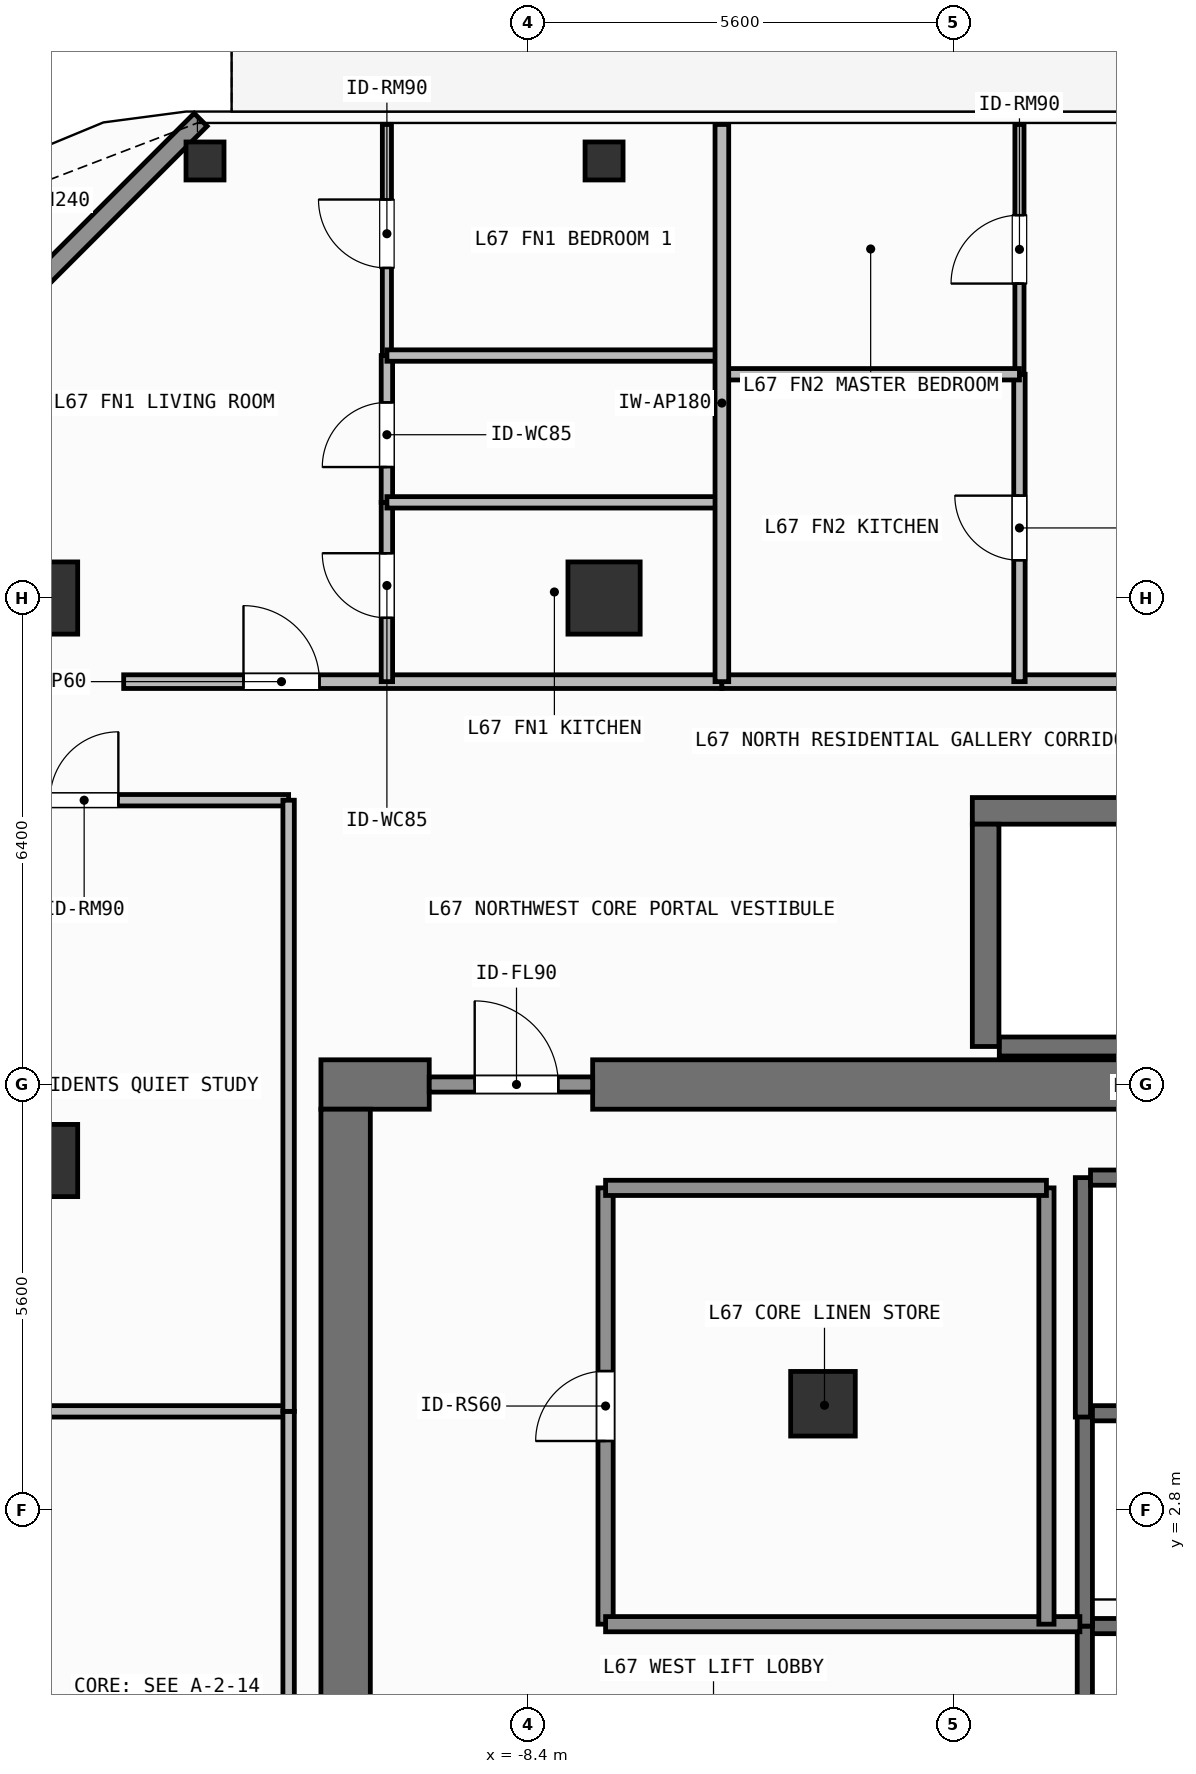
"""IFC4 building model, lengths in metres.
Left out: names, types, materials, properties, quantities, classifications, styles, units other than length and angle.
Written with IfcOpenShell. Run it as: python <this file> out.ifc"""

import sys

from ifc_helpers import new_model, si_unit, direction, frame, frame_2d, origin, origin_2d, place, context, subcontext, project, spatial, rectangle, hollow_rectangle, extrude, element, fill, save


model = new_model("IFC4")
c1 = context("Model", 3, precision=1e-05, world=origin(), true_north=direction((0.0, 1.0)))
c2 = subcontext(c1, "Body", "Model", "MODEL_VIEW")
j1 = project(units=[si_unit("LENGTHUNIT", "METRE"), si_unit("PLANEANGLEUNIT", "RADIAN")], contexts=[c1])
p1 = place(None, origin())
s1 = spatial("IfcSite", under=j1, at=p1, CompositionType="ELEMENT")
p2 = place(p1, origin())
s2 = spatial("IfcBuilding", under=s1, at=p2, CompositionType="ELEMENT")
p3 = place(p2, frame((0.0, 0.0, 274.2)))
s3 = spatial("IfcBuildingStorey", under=s2, at=p3, CompositionType="ELEMENT", Elevation=274.2)
p4 = place(p3, frame((-11.125, 8.4, 0.0), z_axis=(0.0, 0.0, 1.0), x_axis=(1.0, 0.0, 0.0)))
e1 = element("IfcWall", 1, at=p4, inside=s3, PredefinedType="SHEAR", context=c2, shape_type="SweptSolid", body=[
    extrude(rectangle(XDim=1.425, YDim=0.65, at=frame_2d((0.712, 0.0))), origin(), (0.0, 0.0, 1.0), 3.9),
])
p5 = place(p3, frame((-7.55, 8.4, 0.0), z_axis=(0.0, 0.0, 1.0), x_axis=(1.0, 0.0, 0.0)))
e2 = element("IfcWall", 2, at=p5, inside=s3, PredefinedType="SHEAR", context=c2, shape_type="SweptSolid", body=[
    extrude(rectangle(XDim=16.275, YDim=0.65, at=frame_2d((8.138, 0.0))), origin(), (0.0, 0.0, 1.0), 3.9),
])
p6 = place(p3, frame((-10.8, -8.075, 0.0), z_axis=(0.0, 0.0, 1.0), x_axis=(0.0, 1.0, 0.0)))
e3 = element("IfcWall", 3, at=p6, inside=s3, PredefinedType="SHEAR", context=c2, shape_type="SweptSolid", body=[
    extrude(rectangle(XDim=16.15, YDim=0.65, at=frame_2d((8.075, 0.0))), origin(), (0.0, 0.0, 1.0), 3.9),
])
p7 = place(p3, frame((-2.555, 12.0, 0.0), z_axis=(0.0, 0.0, 1.0), x_axis=(1.0, 0.0, 0.0)))
e4 = element("IfcWall", 4, at=p7, inside=s3, PredefinedType="SHEAR", context=c2, shape_type="SweptSolid", body=[
    extrude(rectangle(XDim=7.31, YDim=0.35, at=frame_2d((3.655, 0.0))), origin(), (0.0, 0.0, 1.0), 3.9),
])
p8 = place(p3, frame((-2.2, 8.9, 0.0), z_axis=(0.0, 0.0, 1.0), x_axis=(1.0, 0.0, 0.0)))
e5 = element("IfcWall", 5, at=p8, inside=s3, PredefinedType="SHEAR", context=c2, shape_type="SweptSolid", body=[
    extrude(rectangle(XDim=6.6, YDim=0.25, at=frame_2d((3.3, 0.0))), origin(), (0.0, 0.0, 1.0), 3.9),
])
p9 = place(p3, frame((-2.38, 8.9, 0.0), z_axis=(0.0, 0.0, 1.0), x_axis=(0.0, 1.0, 0.0)))
e6 = element("IfcWall", 6, at=p9, inside=s3, PredefinedType="SHEAR", context=c2, shape_type="SweptSolid", body=[
    extrude(rectangle(XDim=2.925, YDim=0.35, at=frame_2d((1.462, 0.0))), origin(), (0.0, 0.0, 1.0), 3.9),
])
for number, where, z_axis, x_axis in (
    (7, (-14.8, 14.8, 0.0), (0.0, 0.0, 1.0), (1.0, 0.0, 0.0)),
    (8, (-7.4, 14.8, 0.0), (0.0, 0.0, 1.0), (1.0, 0.0, 0.0)),
    (9, (-14.8, 7.4, 0.0), (0.0, 0.0, 1.0), (1.0, 0.0, 0.0)),
):
    element("IfcColumn", number, at=place(p3, frame(where, z_axis=z_axis, x_axis=x_axis)), inside=s3, PredefinedType="COLUMN", context=c2, shape_type="SweptSolid", body=[
        extrude(rectangle(XDim=0.95, YDim=0.95, at=origin_2d()), origin(), (0.0, 0.0, 1.0), 3.9),
    ])
p10 = place(p3, frame((-4.52, 4.2, 0.0), z_axis=(0.0, 0.0, 1.0), x_axis=(1.0, 0.0, 0.0)))
e10 = element("IfcColumn", 10, at=p10, inside=s3, PredefinedType="COLUMN", context=c2, shape_type="SweptSolid", body=[
    extrude(rectangle(XDim=0.85, YDim=0.85, at=origin_2d()), origin(), (0.0, 0.0, 1.0), 3.9),
])
for number, where, z_axis, x_axis in (
    (11, (-12.65, 20.55, 0.0), (0.0, 0.0, 1.0), (1.0, 0.0, 0.0)),
    (12, (-7.4, 20.55, 0.0), (0.0, 0.0, 1.0), (1.0, 0.0, 0.0)),
):
    element("IfcColumn", number, at=place(p3, frame(where, z_axis=z_axis, x_axis=x_axis)), inside=s3, PredefinedType="COLUMN", context=c2, shape_type="SweptSolid", body=[
        extrude(hollow_rectangle(XDim=0.5, YDim=0.5, WallThickness=0.025, at=origin_2d()), origin(), (0.0, 0.0, 1.0), 3.9),
    ])
p11 = place(p3, frame((-16.992, 16.808, 0.0), z_axis=(0.0, 0.0, 1.0), x_axis=(0.707126925818, 0.707086635981, 0.0)))
e13 = element("IfcWall", 13, at=p11, inside=s3, PredefinedType="SOLIDWALL", context=c2, shape_type="SweptSolid", body=[
    extrude(rectangle(XDim=6.06, YDim=0.24, at=frame_2d((3.03, 0.0))), origin(), (0.0, 0.0, 1.0), 3.68),
])
p12 = place(p3, frame((-1.075, -1.525, 0.0), z_axis=(0.0, 0.0, 1.0), x_axis=(0.0, 1.0, 0.0)))
e14 = element("IfcWall", 14, at=p12, inside=s3, PredefinedType="SHEAR", context=c2, shape_type="SweptSolid", body=[
    extrude(rectangle(XDim=2.8, YDim=0.2, at=frame_2d((1.4, 0.0))), origin(), (0.0, 0.0, 1.0), 3.68),
])
p13 = place(p3, frame((-0.975, 1.275, 0.0), z_axis=(0.0, 0.0, 1.0), x_axis=(1.0, 0.0, 0.0)))
e15 = element("IfcWall", 15, at=p13, inside=s3, PredefinedType="SHEAR", context=c2, shape_type="SweptSolid", body=[
    extrude(rectangle(XDim=2.35, YDim=0.2, at=frame_2d((1.175, 0.0))), origin(), (0.0, 0.0, 1.0), 3.68),
])
p14 = place(p3, frame((-1.075, 1.275, 0.0), z_axis=(0.0, 0.0, 1.0), x_axis=(0.0, 1.0, 0.0)))
e16 = element("IfcWall", 16, at=p14, inside=s3, PredefinedType="SHEAR", context=c2, shape_type="SweptSolid", body=[
    extrude(rectangle(XDim=2.8, YDim=0.2, at=frame_2d((1.4, 0.0))), origin(), (0.0, 0.0, 1.0), 3.68),
])
p15 = place(p3, frame((-0.975, 4.075, 0.0), z_axis=(0.0, 0.0, 1.0), x_axis=(1.0, 0.0, 0.0)))
e17 = element("IfcWall", 17, at=p15, inside=s3, PredefinedType="SHEAR", context=c2, shape_type="SweptSolid", body=[
    extrude(rectangle(XDim=2.35, YDim=0.2, at=frame_2d((1.175, 0.0))), origin(), (0.0, 0.0, 1.0), 3.68),
])
p16 = place(p3, frame((-1.1, 4.025, 0.0), z_axis=(0.0, 0.0, 1.0), x_axis=(0.0, 1.0, 0.0)))
e18 = element("IfcWall", 18, at=p16, inside=s3, PredefinedType="SHEAR", context=c2, shape_type="SweptSolid", body=[
    extrude(rectangle(XDim=3.15, YDim=0.2, at=frame_2d((1.575, 0.0))), origin(), (0.0, 0.0, 1.0), 3.68),
])
p17 = place(p3, frame((-1.0, 7.175, 0.0), z_axis=(0.0, 0.0, 1.0), x_axis=(1.0, 0.0, 0.0)))
e19 = element("IfcWall", 19, at=p17, inside=s3, PredefinedType="SHEAR", context=c2, shape_type="SweptSolid", body=[
    extrude(rectangle(XDim=2.4, YDim=0.2, at=frame_2d((1.2, 0.0))), origin(), (0.0, 0.0, 1.0), 3.68),
])
p18 = place(p3, frame((-9.7, 8.4, 0.0), z_axis=(0.0, 0.0, 1.0), x_axis=(1.0, 0.0, 0.0)))
e20 = element("IfcWall", 20, at=p18, inside=s3, PredefinedType="SOLIDWALL", context=c2, shape_type="SweptSolid", body=[
    extrude(rectangle(XDim=2.15, YDim=0.2, at=frame_2d((1.075, 0.0))), origin(), (0.0, 0.0, 1.0), 2.92),
])
p19 = place(p18, frame((0.598, 0.0, 0.0)))
e21 = element("IfcOpeningElement", 21, at=p19, cuts=e20, PredefinedType="OPENING", context=c2, shape_type="SweptSolid", body=[
    extrude(rectangle(XDim=1.1, YDim=2.15, at=frame_2d((0.55, 1.075))), frame((0.0, 0.11, 0.0), z_axis=(0.0, -1.0, 0.0), x_axis=(1.0, 0.0, 0.0)), (0.0, 0.0, 1.0), 0.22),
])
p20 = place(p3, frame((-7.38, 1.3, 0.0), z_axis=(0.0, 0.0, 1.0), x_axis=(0.0, 1.0, 0.0)))
e22 = element("IfcWall", 22, at=p20, inside=s3, PredefinedType="SOLIDWALL", context=c2, shape_type="SweptSolid", body=[
    extrude(rectangle(XDim=5.74, YDim=0.2, at=frame_2d((2.87, 0.0))), origin(), (0.0, 0.0, 1.0), 3.68),
])
p21 = place(p20, frame((2.41, 0.0, 0.0)))
e23 = element("IfcOpeningElement", 23, at=p21, cuts=e22, PredefinedType="OPENING", context=c2, shape_type="SweptSolid", body=[
    extrude(rectangle(XDim=0.92, YDim=2.1, at=frame_2d((0.46, 1.05))), frame((0.0, 0.11, 0.0), z_axis=(0.0, -1.0, 0.0), x_axis=(1.0, 0.0, 0.0)), (0.0, 0.0, 1.0), 0.22),
])
p22 = place(p3, frame((-13.72, 13.7, 0.0), z_axis=(0.0, 0.0, 1.0), x_axis=(1.0, 0.0, 0.0)))
e24 = element("IfcWall", 24, at=p22, inside=s3, PredefinedType="PARTITIONING", context=c2, shape_type="SweptSolid", body=[
    extrude(rectangle(XDim=7.87, YDim=0.18, at=frame_2d((3.935, 0.0))), origin(), (0.0, 0.0, 1.0), 3.68),
])
p23 = place(p22, frame((1.576, 0.0, 0.0)))
e25 = element("IfcOpeningElement", 25, at=p23, cuts=e24, PredefinedType="OPENING", context=c2, shape_type="SweptSolid", body=[
    extrude(rectangle(XDim=1.0, YDim=2.2, at=frame_2d((0.5, 1.1))), frame((0.0, 0.1, 0.0), z_axis=(0.0, -1.0, 0.0), x_axis=(1.0, 0.0, 0.0)), (0.0, 0.0, 1.0), 0.2),
])
p24 = place(p3, frame((-10.257, 13.7, 0.0), z_axis=(0.0, 0.0, 1.0), x_axis=(0.0, 1.0, 0.0)))
e26 = element("IfcWall", 26, at=p24, inside=s3, PredefinedType="PARTITIONING", context=c2, shape_type="SweptSolid", body=[
    extrude(rectangle(XDim=2.359, YDim=0.15, at=frame_2d((1.18, 0.0))), origin(), (0.0, 0.0, 1.0), 3.68),
])
p25 = place(p24, frame((0.839, 0.0, 0.0)))
e27 = element("IfcOpeningElement", 27, at=p25, cuts=e26, PredefinedType="OPENING", context=c2, shape_type="SweptSolid", body=[
    extrude(rectangle(XDim=0.85, YDim=2.1, at=frame_2d((0.425, 1.05))), frame((0.0, 0.085, 0.0), z_axis=(0.0, -1.0, 0.0), x_axis=(1.0, 0.0, 0.0)), (0.0, 0.0, 1.0), 0.17),
])
p26 = place(p3, frame((-10.257, 16.059, 0.0), z_axis=(0.0, 0.0, 1.0), x_axis=(0.0, 1.0, 0.0)))
e28 = element("IfcWall", 28, at=p26, inside=s3, PredefinedType="PARTITIONING", context=c2, shape_type="SweptSolid", body=[
    extrude(rectangle(XDim=1.931, YDim=0.15, at=frame_2d((0.965, 0.0))), origin(), (0.0, 0.0, 1.0), 3.68),
])
p27 = place(p26, frame((0.464, 0.0, 0.0)))
e29 = element("IfcOpeningElement", 29, at=p27, cuts=e28, PredefinedType="OPENING", context=c2, shape_type="SweptSolid", body=[
    extrude(rectangle(XDim=0.85, YDim=2.1, at=frame_2d((0.425, 1.05))), frame((0.0, 0.085, 0.0), z_axis=(0.0, -1.0, 0.0), x_axis=(1.0, 0.0, 0.0)), (0.0, 0.0, 1.0), 0.17),
])
p28 = place(p3, frame((-10.257, 17.99, 0.0), z_axis=(0.0, 0.0, 1.0), x_axis=(0.0, 1.0, 0.0)))
e30 = element("IfcWall", 30, at=p28, inside=s3, PredefinedType="PARTITIONING", context=c2, shape_type="SweptSolid", body=[
    extrude(rectangle(XDim=3.04, YDim=0.12, at=frame_2d((1.52, 0.0))), origin(), (0.0, 0.0, 1.0), 3.68),
])
p29 = place(p28, frame((1.153, 0.0, 0.0)))
e31 = element("IfcOpeningElement", 31, at=p29, cuts=e30, PredefinedType="OPENING", context=c2, shape_type="SweptSolid", body=[
    extrude(rectangle(XDim=0.9, YDim=2.1, at=frame_2d((0.45, 1.05))), frame((0.0, 0.07, 0.0), z_axis=(0.0, -1.0, 0.0), x_axis=(1.0, 0.0, 0.0)), (0.0, 0.0, 1.0), 0.14),
])
p30 = place(p3, frame((-5.85, 13.7, 0.0), z_axis=(0.0, 0.0, 1.0), x_axis=(1.0, 0.0, 0.0)))
e32 = element("IfcWall", 32, at=p30, inside=s3, PredefinedType="PARTITIONING", context=c2, shape_type="SweptSolid", body=[
    extrude(rectangle(XDim=17.368, YDim=0.18, at=frame_2d((8.684, 0.0))), origin(), (0.0, 0.0, 1.0), 3.68),
])
p31 = place(p30, frame((7.114, 0.0, 0.0)))
e33 = element("IfcOpeningElement", 33, at=p31, cuts=e32, PredefinedType="OPENING", context=c2, shape_type="SweptSolid", body=[
    extrude(rectangle(XDim=1.0, YDim=2.2, at=frame_2d((0.5, 1.1))), frame((0.0, 0.1, 0.0), z_axis=(0.0, -1.0, 0.0), x_axis=(1.0, 0.0, 0.0)), (0.0, 0.0, 1.0), 0.2),
])
p32 = place(p3, frame((-1.935, 13.7, 0.0), z_axis=(0.0, 0.0, 1.0), x_axis=(0.0, 1.0, 0.0)))
e34 = element("IfcWall", 34, at=p32, inside=s3, PredefinedType="PARTITIONING", context=c2, shape_type="SweptSolid", body=[
    extrude(rectangle(XDim=4.044, YDim=0.15, at=frame_2d((2.022, 0.0))), origin(), (0.0, 0.0, 1.0), 3.68),
])
p33 = place(p32, frame((1.597, 0.0, 0.0)))
e35 = element("IfcOpeningElement", 35, at=p33, cuts=e34, PredefinedType="OPENING", context=c2, shape_type="SweptSolid", body=[
    extrude(rectangle(XDim=0.85, YDim=2.1, at=frame_2d((0.425, 1.05))), frame((0.0, 0.085, 0.0), z_axis=(0.0, -1.0, 0.0), x_axis=(1.0, 0.0, 0.0)), (0.0, 0.0, 1.0), 0.17),
])
p34 = place(p3, frame((-1.935, 17.744, 0.0), z_axis=(0.0, 0.0, 1.0), x_axis=(0.0, 1.0, 0.0)))
e36 = element("IfcWall", 36, at=p34, inside=s3, PredefinedType="PARTITIONING", context=c2, shape_type="SweptSolid", body=[
    extrude(rectangle(XDim=3.286, YDim=0.12, at=frame_2d((1.643, 0.0))), origin(), (0.0, 0.0, 1.0), 3.68),
])
p35 = place(p34, frame((1.193, 0.0, 0.0)))
e37 = element("IfcOpeningElement", 37, at=p35, cuts=e36, PredefinedType="OPENING", context=c2, shape_type="SweptSolid", body=[
    extrude(rectangle(XDim=0.9, YDim=2.1, at=frame_2d((0.45, 1.05))), frame((0.0, 0.07, 0.0), z_axis=(0.0, -1.0, 0.0), x_axis=(1.0, 0.0, 0.0)), (0.0, 0.0, 1.0), 0.14),
])
p36 = place(p3, frame((-16.93, 12.14, 0.0), z_axis=(0.0, 0.0, 1.0), x_axis=(1.0, 0.0, 0.0)))
e38 = element("IfcWall", 38, at=p36, inside=s3, PredefinedType="PARTITIONING", context=c2, shape_type="SweptSolid", body=[
    extrude(rectangle(XDim=5.38, YDim=0.15, at=frame_2d((2.69, 0.0))), origin(), (0.0, 0.0, 1.0), 3.68),
])
p37 = place(p36, frame((2.24, 0.0, 0.0)))
e39 = element("IfcOpeningElement", 39, at=p37, cuts=e38, PredefinedType="OPENING", context=c2, shape_type="SweptSolid", body=[
    extrude(rectangle(XDim=0.9, YDim=2.1, at=frame_2d((0.45, 1.05))), frame((0.0, 0.085, 0.0), z_axis=(0.0, -1.0, 0.0), x_axis=(1.0, 0.0, 0.0)), (0.0, 0.0, 1.0), 0.17),
])
p38 = place(p3, frame((-7.38, 1.3, 0.0), z_axis=(0.0, 0.0, 1.0), x_axis=(1.0, 0.0, 0.0)))
e40 = element("IfcWall", 40, at=p38, inside=s3, PredefinedType="SOLIDWALL", context=c2, shape_type="SweptSolid", body=[
    extrude(rectangle(XDim=6.24, YDim=0.2, at=frame_2d((3.12, 0.0))), origin(), (0.0, 0.0, 1.0), 3.68),
])
p39 = place(p3, frame((-1.58, 1.3, 0.0), z_axis=(0.0, 0.0, 1.0), x_axis=(0.0, 1.0, 0.0)))
e41 = element("IfcWall", 41, at=p39, inside=s3, PredefinedType="SOLIDWALL", context=c2, shape_type="SweptSolid", body=[
    extrude(rectangle(XDim=5.74, YDim=0.2, at=frame_2d((2.87, 0.0))), origin(), (0.0, 0.0, 1.0), 3.68),
])
p40 = place(p3, frame((-7.38, 7.04, 0.0), z_axis=(0.0, 0.0, 1.0), x_axis=(1.0, 0.0, 0.0)))
e42 = element("IfcWall", 42, at=p40, inside=s3, PredefinedType="SOLIDWALL", context=c2, shape_type="SweptSolid", body=[
    extrude(rectangle(XDim=5.8, YDim=0.2, at=frame_2d((2.9, 0.0))), origin(), (0.0, 0.0, 1.0), 3.68),
])
for number, where, z_axis, x_axis in (
    (43, (-10.257, 16.059, 0.0), (0.0, 0.0, 1.0), (1.0, 0.0, 0.0)),
    (44, (-10.257, 17.99, 0.0), (0.0, 0.0, 1.0), (1.0, 0.0, 0.0)),
):
    element("IfcWall", number, at=place(p3, frame(where, z_axis=z_axis, x_axis=x_axis)), inside=s3, PredefinedType="PARTITIONING", context=c2, shape_type="SweptSolid", body=[
        extrude(rectangle(XDim=4.407, YDim=0.15, at=frame_2d((2.204, 0.0))), origin(), (0.0, 0.0, 1.0), 3.68),
    ])
p41 = place(p3, frame((-5.85, 17.744, 0.0), z_axis=(0.0, 0.0, 1.0), x_axis=(1.0, 0.0, 0.0)))
e45 = element("IfcWall", 45, at=p41, inside=s3, PredefinedType="PARTITIONING", context=c2, shape_type="SweptSolid", body=[
    extrude(rectangle(XDim=3.915, YDim=0.15, at=frame_2d((1.958, 0.0))), origin(), (0.0, 0.0, 1.0), 3.68),
])
p42 = place(p3, frame((-5.85, 13.7, 0.0), z_axis=(0.0, 0.0, 1.0), x_axis=(0.0, 1.0, 0.0)))
e46 = element("IfcWall", 46, at=p42, inside=s3, PredefinedType="PARTITIONING", context=c2, shape_type="SweptSolid", body=[
    extrude(rectangle(XDim=7.33, YDim=0.18, at=frame_2d((3.665, 0.0))), origin(), (0.0, 0.0, 1.0), 3.68),
])
p43 = place(p3, frame((-16.93, 4.1, 0.0), z_axis=(0.0, 0.0, 1.0), x_axis=(1.0, 0.0, 0.0)))
e47 = element("IfcWall", 47, at=p43, inside=s3, PredefinedType="PARTITIONING", context=c2, shape_type="SweptSolid", body=[
    extrude(rectangle(XDim=5.38, YDim=0.15, at=frame_2d((2.69, 0.0))), origin(), (0.0, 0.0, 1.0), 3.68),
])
p44 = place(p3, frame((-11.55, -12.14, 0.0), z_axis=(0.0, 0.0, 1.0), x_axis=(0.0, 1.0, 0.0)))
e48 = element("IfcWall", 48, at=p44, inside=s3, PredefinedType="PARTITIONING", context=c2, shape_type="SweptSolid", body=[
    extrude(rectangle(XDim=16.24, YDim=0.15, at=frame_2d((8.12, 0.0))), origin(), (0.0, 0.0, 1.0), 3.68),
])
p45 = place(p3, frame((-11.55, 4.1, 0.0), z_axis=(0.0, 0.0, 1.0), x_axis=(0.0, 1.0, 0.0)))
e49 = element("IfcWall", 49, at=p45, inside=s3, PredefinedType="PARTITIONING", context=c2, shape_type="SweptSolid", body=[
    extrude(rectangle(XDim=8.04, YDim=0.15, at=frame_2d((4.02, 0.0))), origin(), (0.0, 0.0, 1.0), 3.68),
])
p46 = place(p19, origin())
e50 = element("IfcDoor", 50, at=p46, inside=s3, OperationType="SINGLE_SWING_LEFT", PredefinedType="DOOR", context=c2, shape_type="SweptSolid", body=[
    extrude(rectangle(XDim=1.1, YDim=2.15, at=frame_2d((0.55, 1.075))), frame((0.0, 0.025, 0.0), z_axis=(0.0, -1.0, 0.0), x_axis=(1.0, 0.0, 0.0)), (0.0, 0.0, 1.0), 0.05),
])
fill(e21, e50)
p47 = place(p21, origin())
e51 = element("IfcDoor", 51, at=p47, inside=s3, OperationType="SINGLE_SWING_LEFT", PredefinedType="DOOR", context=c2, shape_type="SweptSolid", body=[
    extrude(rectangle(XDim=0.92, YDim=2.1, at=frame_2d((0.46, 1.05))), frame((0.0, 0.025, 0.0), z_axis=(0.0, -1.0, 0.0), x_axis=(1.0, 0.0, 0.0)), (0.0, 0.0, 1.0), 0.05),
])
fill(e23, e51)
p48 = place(p23, origin())
e52 = element("IfcDoor", 52, at=p48, inside=s3, OperationType="SINGLE_SWING_LEFT", PredefinedType="DOOR", context=c2, shape_type="SweptSolid", body=[
    extrude(rectangle(XDim=1.0, YDim=2.2, at=frame_2d((0.5, 1.1))), frame((0.0, 0.025, 0.0), z_axis=(0.0, -1.0, 0.0), x_axis=(1.0, 0.0, 0.0)), (0.0, 0.0, 1.0), 0.05),
])
fill(e25, e52)
p49 = place(p25, origin())
e53 = element("IfcDoor", 53, at=p49, inside=s3, OperationType="SINGLE_SWING_RIGHT", PredefinedType="DOOR", context=c2, shape_type="SweptSolid", body=[
    extrude(rectangle(XDim=0.85, YDim=2.1, at=frame_2d((0.425, 1.05))), frame((0.0, 0.025, 0.0), z_axis=(0.0, -1.0, 0.0), x_axis=(1.0, 0.0, 0.0)), (0.0, 0.0, 1.0), 0.05),
])
fill(e27, e53)
p50 = place(p27, origin())
e54 = element("IfcDoor", 54, at=p50, inside=s3, OperationType="SINGLE_SWING_LEFT", PredefinedType="DOOR", context=c2, shape_type="SweptSolid", body=[
    extrude(rectangle(XDim=0.85, YDim=2.1, at=frame_2d((0.425, 1.05))), frame((0.0, 0.025, 0.0), z_axis=(0.0, -1.0, 0.0), x_axis=(1.0, 0.0, 0.0)), (0.0, 0.0, 1.0), 0.05),
])
fill(e29, e54)
p51 = place(p29, origin())
e55 = element("IfcDoor", 55, at=p51, inside=s3, OperationType="SINGLE_SWING_RIGHT", PredefinedType="DOOR", context=c2, shape_type="SweptSolid", body=[
    extrude(rectangle(XDim=0.9, YDim=2.1, at=frame_2d((0.45, 1.05))), frame((0.0, 0.025, 0.0), z_axis=(0.0, -1.0, 0.0), x_axis=(1.0, 0.0, 0.0)), (0.0, 0.0, 1.0), 0.05),
])
fill(e31, e55)
p52 = place(p33, origin())
e56 = element("IfcDoor", 56, at=p52, inside=s3, OperationType="SINGLE_SWING_RIGHT", PredefinedType="DOOR", context=c2, shape_type="SweptSolid", body=[
    extrude(rectangle(XDim=0.85, YDim=2.1, at=frame_2d((0.425, 1.05))), frame((0.0, 0.025, 0.0), z_axis=(0.0, -1.0, 0.0), x_axis=(1.0, 0.0, 0.0)), (0.0, 0.0, 1.0), 0.05),
])
fill(e35, e56)
p53 = place(p35, origin())
e57 = element("IfcDoor", 57, at=p53, inside=s3, OperationType="SINGLE_SWING_LEFT", PredefinedType="DOOR", context=c2, shape_type="SweptSolid", body=[
    extrude(rectangle(XDim=0.9, YDim=2.1, at=frame_2d((0.45, 1.05))), frame((0.0, 0.025, 0.0), z_axis=(0.0, -1.0, 0.0), x_axis=(1.0, 0.0, 0.0)), (0.0, 0.0, 1.0), 0.05),
])
fill(e37, e57)
p54 = place(p37, origin())
e58 = element("IfcDoor", 58, at=p54, inside=s3, OperationType="SINGLE_SWING_RIGHT", PredefinedType="DOOR", context=c2, shape_type="SweptSolid", body=[
    extrude(rectangle(XDim=0.9, YDim=2.1, at=frame_2d((0.45, 1.05))), frame((0.0, 0.025, 0.0), z_axis=(0.0, -1.0, 0.0), x_axis=(1.0, 0.0, 0.0)), (0.0, 0.0, 1.0), 0.05),
])
fill(e39, e58)
save(model, sys.argv[1])
